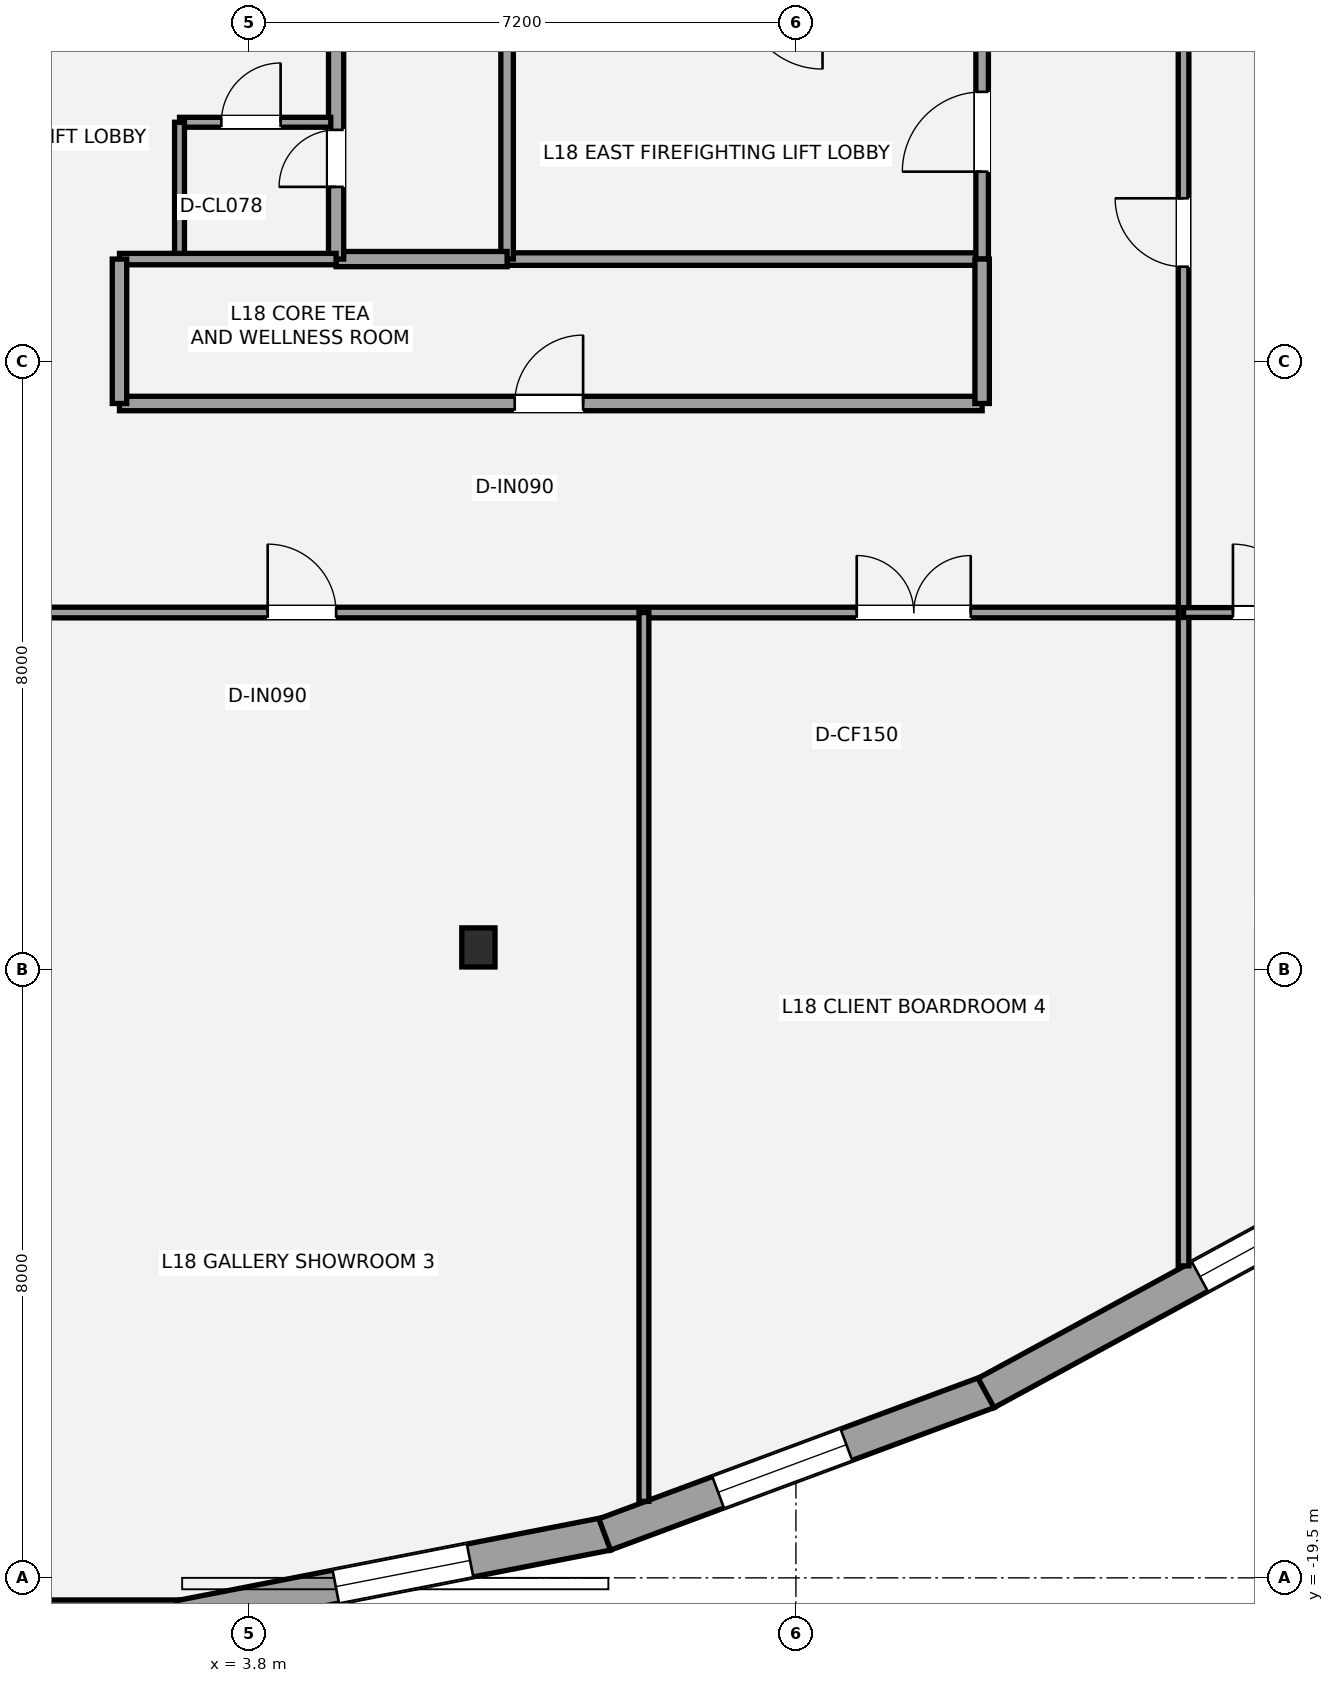
"""IFC4 building model, lengths in metres.
Left out: names, types, materials, properties, quantities, classifications, styles, units other than length and angle.
Written with IfcOpenShell. Run it as: python <this file> out.ifc"""

import sys

from ifc_helpers import new_model, si_unit, direction, frame, frame_2d, origin, origin_2d, place, context, subcontext, project, spatial, rectangle, i_section, extrude, element, fill, save


model = new_model("IFC4")
c1 = context("Model", 3, precision=1e-05, world=origin(), true_north=direction((0.0, 1.0)))
c2 = subcontext(c1, "Body", "Model", "MODEL_VIEW")
j1 = project(units=[si_unit("LENGTHUNIT", "METRE"), si_unit("PLANEANGLEUNIT", "RADIAN")], contexts=[c1])
p1 = place(None, origin())
s1 = spatial("IfcSite", under=j1, at=p1, CompositionType="ELEMENT")
p2 = place(p1, origin())
s2 = spatial("IfcBuilding", under=s1, at=p2, CompositionType="ELEMENT")
p3 = place(p2, frame((0.0, 0.0, 70.2)))
s3 = spatial("IfcBuildingStorey", under=s2, at=p3, CompositionType="ELEMENT", Elevation=70.2)
p4 = place(p3, frame((6.822, -11.206, 0.0), z_axis=(0.0, 0.0, 1.0), x_axis=(1.0, 0.0, 0.0)))
e1 = element("IfcColumn", 1, at=p4, inside=s3, PredefinedType="COLUMN", context=c2, shape_type="SweptSolid", body=[
    extrude(i_section(OverallWidth=0.437, OverallDepth=0.514, WebThickness=0.061, FlangeThickness=0.097, at=origin_2d()), origin(), (0.0, 0.0, 1.0), 3.6),
])
p5 = place(p3, frame((2.939, -20.011, 0.0), z_axis=(0.0, 0.0, 1.0), x_axis=(-1.0, 0.0, 0.0)))
e2 = element("IfcWall", 2, at=p5, inside=s3, PredefinedType="STANDARD", context=c2, shape_type="SweptSolid", body=[
    extrude(rectangle(XDim=5.877, YDim=0.44, at=frame_2d((2.939, 0.0))), origin(), (0.0, 0.0, 1.0), 2.529),
])
p6 = place(p5, frame((3.181, 0.0, 0.65)))
e3 = element("IfcOpeningElement", 3, at=p6, cuts=e2, PredefinedType="OPENING", context=c2, shape_type="SweptSolid", body=[
    extrude(rectangle(XDim=1.8, YDim=1.7, at=frame_2d((0.9, 0.85))), frame((0.0, 0.23, 0.0), z_axis=(0.0, -1.0, 0.0), x_axis=(1.0, 0.0, 0.0)), (0.0, 0.0, 1.0), 0.46),
])
p7 = place(p3, frame((8.518, -18.919, 0.0), z_axis=(0.0, 0.0, 1.0), x_axis=(-0.981531216559, -0.191302041079, 0.0)))
e4 = element("IfcWall", 4, at=p7, inside=s3, PredefinedType="STANDARD", context=c2, shape_type="SweptSolid", body=[
    extrude(rectangle(XDim=5.728, YDim=0.44, at=frame_2d((2.864, 0.0))), origin(), (0.0, 0.0, 1.0), 2.529),
])
p8 = place(p7, frame((1.84, 0.0, 0.65)))
e5 = element("IfcOpeningElement", 5, at=p8, cuts=e4, PredefinedType="OPENING", context=c2, shape_type="SweptSolid", body=[
    extrude(rectangle(XDim=1.8, YDim=1.7, at=frame_2d((0.9, 0.85))), frame((0.0, 0.23, 0.0), z_axis=(0.0, -1.0, 0.0), x_axis=(1.0, 0.0, 0.0)), (0.0, 0.0, 1.0), 0.46),
])
p9 = place(p3, frame((13.53, -17.055, 0.0), z_axis=(0.0, 0.0, 1.0), x_axis=(-0.93742061918, -0.348199056195, 0.0)))
e6 = element("IfcWall", 6, at=p9, inside=s3, PredefinedType="STANDARD", context=c2, shape_type="SweptSolid", body=[
    extrude(rectangle(XDim=5.383, YDim=0.44, at=frame_2d((2.691, 0.0))), origin(), (0.0, 0.0, 1.0), 2.529),
])
p10 = place(p9, frame((1.99, 0.0, 0.65)))
e7 = element("IfcOpeningElement", 7, at=p10, cuts=e6, PredefinedType="OPENING", context=c2, shape_type="SweptSolid", body=[
    extrude(rectangle(XDim=1.8, YDim=1.7, at=frame_2d((0.9, 0.85))), frame((0.0, 0.23, 0.0), z_axis=(0.0, -1.0, 0.0), x_axis=(1.0, 0.0, 0.0)), (0.0, 0.0, 1.0), 0.46),
])
p11 = place(p3, frame((17.895, -14.679, 0.0), z_axis=(0.0, 0.0, 1.0), x_axis=(-0.878571961318, -0.477609996531, 0.0)))
e8 = element("IfcWall", 8, at=p11, inside=s3, PredefinedType="STANDARD", context=c2, shape_type="SweptSolid", body=[
    extrude(rectangle(XDim=5.001, YDim=0.44, at=frame_2d((2.5, 0.0))), origin(), (0.0, 0.0, 1.0), 2.529),
])
p12 = place(p11, frame((0.298, 0.0, 0.65)))
e9 = element("IfcOpeningElement", 9, at=p12, cuts=e8, PredefinedType="OPENING", context=c2, shape_type="SweptSolid", body=[
    extrude(rectangle(XDim=1.5, YDim=1.7, at=frame_2d((0.75, 0.85))), frame((0.0, 0.23, 0.0), z_axis=(0.0, -1.0, 0.0), x_axis=(1.0, 0.0, 0.0)), (0.0, 0.0, 1.0), 0.46),
])
p13 = place(p3, frame((7.2, -2.15, 0.0), z_axis=(0.0, 0.0, 1.0), x_axis=(1.0, 0.0, 0.0)))
e10 = element("IfcWall", 10, at=p13, inside=s3, PredefinedType="PARTITIONING", context=c2, shape_type="SweptSolid", body=[
    extrude(rectangle(XDim=6.25, YDim=0.165, at=frame_2d((3.125, 0.0))), origin(), (0.0, 0.0, 1.0), 3.4),
])
p14 = place(p3, frame((7.2, -2.15, 0.0), z_axis=(0.0, 0.0, 1.0), x_axis=(0.0, 1.0, 0.0)))
e11 = element("IfcWall", 11, at=p14, inside=s3, PredefinedType="PARTITIONING", context=c2, shape_type="SweptSolid", body=[
    extrude(rectangle(XDim=3.15, YDim=0.165, at=frame_2d((1.575, 0.0))), origin(), (0.0, 0.0, 1.0), 2.853),
])
p15 = place(p3, frame((13.45, -2.15, 0.0), z_axis=(0.0, 0.0, 1.0), x_axis=(0.0, 1.0, 0.0)))
e12 = element("IfcWall", 12, at=p15, inside=s3, PredefinedType="PARTITIONING", context=c2, shape_type="SweptSolid", body=[
    extrude(rectangle(XDim=3.15, YDim=0.165, at=frame_2d((1.575, 0.0))), origin(), (0.0, 0.0, 1.0), 2.853),
])
p16 = place(p15, frame((1.15, 0.0, 0.0)))
e13 = element("IfcOpeningElement", 13, at=p16, cuts=e12, PredefinedType="OPENING", context=c2, shape_type="SweptSolid", body=[
    extrude(rectangle(XDim=1.05, YDim=2.15, at=frame_2d((0.525, 1.075))), frame((0.0, 0.093, 0.0), z_axis=(0.0, -1.0, 0.0), x_axis=(1.0, 0.0, 0.0)), (0.0, 0.0, 1.0), 0.185),
])
p17 = place(p3, frame((4.95, -2.15, 0.0), z_axis=(0.0, 0.0, 1.0), x_axis=(1.0, 0.0, 0.0)))
e14 = element("IfcWall", 14, at=p17, inside=s3, PredefinedType="SOLIDWALL", context=c2, shape_type="SweptSolid", body=[
    extrude(rectangle(XDim=2.25, YDim=0.2, at=frame_2d((1.125, 0.0))), origin(), (0.0, 0.0, 1.0), 3.4),
])
p18 = place(p3, frame((4.95, -2.15, 0.0), z_axis=(0.0, 0.0, 1.0), x_axis=(0.0, 1.0, 0.0)))
e15 = element("IfcWall", 15, at=p18, inside=s3, PredefinedType="SOLIDWALL", context=c2, shape_type="SweptSolid", body=[
    extrude(rectangle(XDim=3.15, YDim=0.2, at=frame_2d((1.575, 0.0))), origin(), (0.0, 0.0, 1.0), 2.853),
])
p19 = place(p18, frame((0.95, 0.0, 0.0)))
e16 = element("IfcOpeningElement", 16, at=p19, cuts=e15, PredefinedType="OPENING", context=c2, shape_type="SweptSolid", body=[
    extrude(rectangle(XDim=0.75, YDim=2.1, at=frame_2d((0.375, 1.05))), frame((0.0, 0.11, 0.0), z_axis=(0.0, -1.0, 0.0), x_axis=(1.0, 0.0, 0.0)), (0.0, 0.0, 1.0), 0.22),
])
p20 = place(p3, frame((2.89, -0.35, 0.0), z_axis=(0.0, 0.0, 1.0), x_axis=(1.0, 0.0, 0.0)))
e17 = element("IfcWall", 17, at=p20, inside=s3, PredefinedType="PARTITIONING", context=c2, shape_type="SweptSolid", body=[
    extrude(rectangle(XDim=1.99, YDim=0.13, at=frame_2d((0.995, 0.0))), origin(), (0.0, 0.0, 1.0), 3.4),
])
p21 = place(p20, frame((0.55, 0.0, 0.0)))
e18 = element("IfcOpeningElement", 18, at=p21, cuts=e17, PredefinedType="OPENING", context=c2, shape_type="SweptSolid", body=[
    extrude(rectangle(XDim=0.78, YDim=2.1, at=frame_2d((0.39, 1.05))), frame((0.0, 0.075, 0.0), z_axis=(0.0, -1.0, 0.0), x_axis=(1.0, 0.0, 0.0)), (0.0, 0.0, 1.0), 0.15),
])
p22 = place(p3, frame((2.89, -2.15, 0.0), z_axis=(0.0, 0.0, 1.0), x_axis=(0.0, 1.0, 0.0)))
e19 = element("IfcWall", 19, at=p22, inside=s3, PredefinedType="PARTITIONING", context=c2, shape_type="SweptSolid", body=[
    extrude(rectangle(XDim=1.8, YDim=0.13, at=frame_2d((0.9, 0.0))), origin(), (0.0, 0.0, 1.0), 3.4),
])
p23 = place(p3, frame((2.1, -4.05, 0.0), z_axis=(0.0, 0.0, 1.0), x_axis=(1.0, 0.0, 0.0)))
e20 = element("IfcWall", 20, at=p23, inside=s3, PredefinedType="PLUMBINGWALL", context=c2, shape_type="SweptSolid", body=[
    extrude(rectangle(XDim=11.35, YDim=0.19, at=frame_2d((5.675, 0.0))), origin(), (0.0, 0.0, 1.0), 3.4),
])
p24 = place(p23, frame((5.2, 0.0, 0.0)))
e21 = element("IfcOpeningElement", 21, at=p24, cuts=e20, PredefinedType="OPENING", context=c2, shape_type="SweptSolid", body=[
    extrude(rectangle(XDim=0.9, YDim=2.1, at=frame_2d((0.45, 1.05))), frame((0.0, 0.105, 0.0), z_axis=(0.0, -1.0, 0.0), x_axis=(1.0, 0.0, 0.0)), (0.0, 0.0, 1.0), 0.21),
])
p25 = place(p3, frame((2.1, -2.15, 0.0), z_axis=(0.0, 0.0, 1.0), x_axis=(1.0, 0.0, 0.0)))
e22 = element("IfcWall", 22, at=p25, inside=s3, PredefinedType="PLUMBINGWALL", context=c2, shape_type="SweptSolid", body=[
    extrude(rectangle(XDim=2.85, YDim=0.15, at=frame_2d((1.425, 0.0))), origin(), (0.0, 0.0, 1.0), 3.4),
])
p26 = place(p3, frame((2.1, -4.05, 0.0), z_axis=(0.0, 0.0, 1.0), x_axis=(0.0, 1.0, 0.0)))
e23 = element("IfcWall", 23, at=p26, inside=s3, PredefinedType="PLUMBINGWALL", context=c2, shape_type="SweptSolid", body=[
    extrude(rectangle(XDim=1.9, YDim=0.19, at=frame_2d((0.95, 0.0))), origin(), (0.0, 0.0, 1.0), 3.4),
])
p27 = place(p3, frame((13.45, -4.05, 0.0), z_axis=(0.0, 0.0, 1.0), x_axis=(0.0, 1.0, 0.0)))
e24 = element("IfcWall", 24, at=p27, inside=s3, PredefinedType="PLUMBINGWALL", context=c2, shape_type="SweptSolid", body=[
    extrude(rectangle(XDim=1.9, YDim=0.19, at=frame_2d((0.95, 0.0))), origin(), (0.0, 0.0, 1.0), 2.853),
])
p28 = place(p3, frame((-18.6, -6.8, 0.0), z_axis=(0.0, 0.0, 1.0), x_axis=(1.0, 0.0, 0.0)))
e25 = element("IfcWall", 25, at=p28, inside=s3, PredefinedType="PARTITIONING", context=c2, shape_type="SweptSolid", body=[
    extrude(rectangle(XDim=34.7, YDim=0.14, at=frame_2d((17.35, 0.0))), origin(), (0.0, 0.0, 1.0), 2.853),
])
p29 = place(p28, frame((4.35, 0.0, 0.0)))
e26 = element("IfcOpeningElement", 26, at=p29, cuts=e25, PredefinedType="OPENING", context=c2, shape_type="SweptSolid", body=[
    extrude(rectangle(XDim=0.9, YDim=2.1, at=frame_2d((0.45, 1.05))), frame((0.0, 0.08, 0.0), z_axis=(0.0, -1.0, 0.0), x_axis=(1.0, 0.0, 0.0)), (0.0, 0.0, 1.0), 0.16),
])
p30 = place(p28, frame((13.65, 0.0, 0.0)))
e27 = element("IfcOpeningElement", 27, at=p30, cuts=e25, PredefinedType="OPENING", context=c2, shape_type="SweptSolid", body=[
    extrude(rectangle(XDim=0.9, YDim=2.1, at=frame_2d((0.45, 1.05))), frame((0.0, 0.08, 0.0), z_axis=(0.0, -1.0, 0.0), x_axis=(1.0, 0.0, 0.0)), (0.0, 0.0, 1.0), 0.16),
])
p31 = place(p28, frame((22.65, 0.0, 0.0)))
e28 = element("IfcOpeningElement", 28, at=p31, cuts=e25, PredefinedType="OPENING", context=c2, shape_type="SweptSolid", body=[
    extrude(rectangle(XDim=0.9, YDim=2.1, at=frame_2d((0.45, 1.05))), frame((0.0, 0.08, 0.0), z_axis=(0.0, -1.0, 0.0), x_axis=(1.0, 0.0, 0.0)), (0.0, 0.0, 1.0), 0.16),
])
p32 = place(p28, frame((30.4, 0.0, 0.0)))
e29 = element("IfcOpeningElement", 29, at=p32, cuts=e25, PredefinedType="OPENING", context=c2, shape_type="SweptSolid", body=[
    extrude(rectangle(XDim=1.5, YDim=2.15, at=frame_2d((0.75, 1.075))), frame((0.0, 0.08, 0.0), z_axis=(0.0, -1.0, 0.0), x_axis=(1.0, 0.0, 0.0)), (0.0, 0.0, 1.0), 0.16),
])
p33 = place(p3, frame((16.1, -15.395, 0.0), z_axis=(0.0, 0.0, 1.0), x_axis=(0.0, 1.0, 0.0)))
e30 = element("IfcWall", 30, at=p33, inside=s3, PredefinedType="PARTITIONING", context=c2, shape_type="SweptSolid", body=[
    extrude(rectangle(XDim=21.245, YDim=0.14, at=frame_2d((10.623, 0.0))), origin(), (0.0, 0.0, 1.0), 2.841),
])
p34 = place(p33, frame((13.145, 0.0, 0.0)))
e31 = element("IfcOpeningElement", 31, at=p34, cuts=e30, PredefinedType="OPENING", context=c2, shape_type="SweptSolid", body=[
    extrude(rectangle(XDim=0.9, YDim=2.1, at=frame_2d((0.45, 1.05))), frame((0.0, 0.08, 0.0), z_axis=(0.0, -1.0, 0.0), x_axis=(1.0, 0.0, 0.0)), (0.0, 0.0, 1.0), 0.16),
])
p35 = place(p33, frame((19.47, 0.0, 0.0)))
e32 = element("IfcOpeningElement", 32, at=p35, cuts=e30, PredefinedType="OPENING", context=c2, shape_type="SweptSolid", body=[
    extrude(rectangle(XDim=0.9, YDim=2.1, at=frame_2d((0.45, 1.05))), frame((0.0, 0.08, 0.0), z_axis=(0.0, -1.0, 0.0), x_axis=(1.0, 0.0, 0.0)), (0.0, 0.0, 1.0), 0.16),
])
p36 = place(p3, frame((9.0, -18.494, 0.0), z_axis=(0.0, 0.0, 1.0), x_axis=(0.0, 1.0, 0.0)))
e33 = element("IfcWall", 33, at=p36, inside=s3, PredefinedType="PARTITIONING", context=c2, shape_type="SweptSolid", body=[
    extrude(rectangle(XDim=11.694, YDim=0.13, at=frame_2d((5.847, 0.0))), origin(), (0.0, 0.0, 1.0), 3.4),
])
p37 = place(p3, frame((16.1, -6.8, 0.0), z_axis=(0.0, 0.0, 1.0), x_axis=(1.0, 0.0, 0.0)))
e34 = element("IfcWall", 34, at=p37, inside=s3, PredefinedType="PARTITIONING", context=c2, shape_type="SweptSolid", body=[
    extrude(rectangle(XDim=10.74, YDim=0.13, at=frame_2d((5.37, 0.0))), origin(), (0.0, 0.0, 1.0), 2.779),
])
p38 = place(p37, frame((0.65, 0.0, 0.0)))
e35 = element("IfcOpeningElement", 35, at=p38, cuts=e34, PredefinedType="OPENING", context=c2, shape_type="SweptSolid", body=[
    extrude(rectangle(XDim=0.9, YDim=2.1, at=frame_2d((0.45, 1.05))), frame((0.0, 0.075, 0.0), z_axis=(0.0, -1.0, 0.0), x_axis=(1.0, 0.0, 0.0)), (0.0, 0.0, 1.0), 0.15),
])
p39 = place(p8, origin())
e36 = element("IfcWindow", 36, at=p39, inside=s3, PartitioningType="SINGLE_PANEL", PredefinedType="WINDOW", context=c2, shape_type="SweptSolid", body=[
    extrude(rectangle(XDim=1.8, YDim=1.7, at=frame_2d((0.9, 0.85))), frame((0.0, -0.01, 0.0), z_axis=(0.0, -1.0, 0.0), x_axis=(1.0, 0.0, 0.0)), (0.0, 0.0, 1.0), 0.06),
])
fill(e5, e36)
p40 = place(p10, origin())
e37 = element("IfcWindow", 37, at=p40, inside=s3, PartitioningType="SINGLE_PANEL", PredefinedType="WINDOW", context=c2, shape_type="SweptSolid", body=[
    extrude(rectangle(XDim=1.8, YDim=1.7, at=frame_2d((0.9, 0.85))), frame((0.0, -0.01, 0.0), z_axis=(0.0, -1.0, 0.0), x_axis=(1.0, 0.0, 0.0)), (0.0, 0.0, 1.0), 0.06),
])
fill(e7, e37)
p41 = place(p12, origin())
e38 = element("IfcWindow", 38, at=p41, inside=s3, PartitioningType="SINGLE_PANEL", PredefinedType="WINDOW", context=c2, shape_type="SweptSolid", body=[
    extrude(rectangle(XDim=1.5, YDim=1.7, at=frame_2d((0.75, 0.85))), frame((0.0, -0.01, 0.0), z_axis=(0.0, -1.0, 0.0), x_axis=(1.0, 0.0, 0.0)), (0.0, 0.0, 1.0), 0.06),
])
fill(e9, e38)
p42 = place(p16, origin())
e39 = element("IfcDoor", 39, at=p42, inside=s3, OperationType="SINGLE_SWING_LEFT", PredefinedType="DOOR", context=c2, shape_type="SweptSolid", body=[
    extrude(rectangle(XDim=1.05, YDim=2.15, at=frame_2d((0.525, 1.075))), frame((0.0, 0.025, 0.0), z_axis=(0.0, -1.0, 0.0), x_axis=(1.0, 0.0, 0.0)), (0.0, 0.0, 1.0), 0.05),
])
fill(e13, e39)
p43 = place(p19, origin())
e40 = element("IfcDoor", 40, at=p43, inside=s3, OperationType="SINGLE_SWING_LEFT", PredefinedType="DOOR", context=c2, shape_type="SweptSolid", body=[
    extrude(rectangle(XDim=0.75, YDim=2.1, at=frame_2d((0.375, 1.05))), frame((0.0, 0.025, 0.0), z_axis=(0.0, -1.0, 0.0), x_axis=(1.0, 0.0, 0.0)), (0.0, 0.0, 1.0), 0.05),
])
fill(e16, e40)
p44 = place(p21, origin())
e41 = element("IfcDoor", 41, at=p44, inside=s3, OperationType="SINGLE_SWING_RIGHT", PredefinedType="DOOR", context=c2, shape_type="SweptSolid", body=[
    extrude(rectangle(XDim=0.78, YDim=2.1, at=frame_2d((0.39, 1.05))), frame((0.0, 0.025, 0.0), z_axis=(0.0, -1.0, 0.0), x_axis=(1.0, 0.0, 0.0)), (0.0, 0.0, 1.0), 0.05),
])
fill(e18, e41)
p45 = place(p24, origin())
e42 = element("IfcDoor", 42, at=p45, inside=s3, OperationType="SINGLE_SWING_RIGHT", PredefinedType="DOOR", context=c2, shape_type="SweptSolid", body=[
    extrude(rectangle(XDim=0.9, YDim=2.1, at=frame_2d((0.45, 1.05))), frame((0.0, 0.025, 0.0), z_axis=(0.0, -1.0, 0.0), x_axis=(1.0, 0.0, 0.0)), (0.0, 0.0, 1.0), 0.05),
])
fill(e21, e42)
p46 = place(p31, origin())
e43 = element("IfcDoor", 43, at=p46, inside=s3, OperationType="SINGLE_SWING_LEFT", PredefinedType="DOOR", context=c2, shape_type="SweptSolid", body=[
    extrude(rectangle(XDim=0.9, YDim=2.1, at=frame_2d((0.45, 1.05))), frame((0.0, 0.025, 0.0), z_axis=(0.0, -1.0, 0.0), x_axis=(1.0, 0.0, 0.0)), (0.0, 0.0, 1.0), 0.05),
])
fill(e28, e43)
p47 = place(p32, origin())
e44 = element("IfcDoor", 44, at=p47, inside=s3, OperationType="DOUBLE_DOOR_SINGLE_SWING", PredefinedType="DOOR", context=c2, shape_type="SweptSolid", body=[
    extrude(rectangle(XDim=1.5, YDim=2.15, at=frame_2d((0.75, 1.075))), frame((0.0, 0.025, 0.0), z_axis=(0.0, -1.0, 0.0), x_axis=(1.0, 0.0, 0.0)), (0.0, 0.0, 1.0), 0.05),
])
fill(e29, e44)
p48 = place(p38, origin())
e45 = element("IfcDoor", 45, at=p48, inside=s3, OperationType="SINGLE_SWING_LEFT", PredefinedType="DOOR", context=c2, shape_type="SweptSolid", body=[
    extrude(rectangle(XDim=0.9, YDim=2.1, at=frame_2d((0.45, 1.05))), frame((0.0, 0.025, 0.0), z_axis=(0.0, -1.0, 0.0), x_axis=(1.0, 0.0, 0.0)), (0.0, 0.0, 1.0), 0.05),
])
fill(e35, e45)
p49 = place(p34, origin())
e46 = element("IfcDoor", 46, at=p49, inside=s3, OperationType="SINGLE_SWING_RIGHT", PredefinedType="DOOR", context=c2, shape_type="SweptSolid", body=[
    extrude(rectangle(XDim=0.9, YDim=2.1, at=frame_2d((0.45, 1.05))), frame((0.0, 0.025, 0.0), z_axis=(0.0, -1.0, 0.0), x_axis=(1.0, 0.0, 0.0)), (0.0, 0.0, 1.0), 0.05),
])
fill(e31, e46)
save(model, sys.argv[1])
